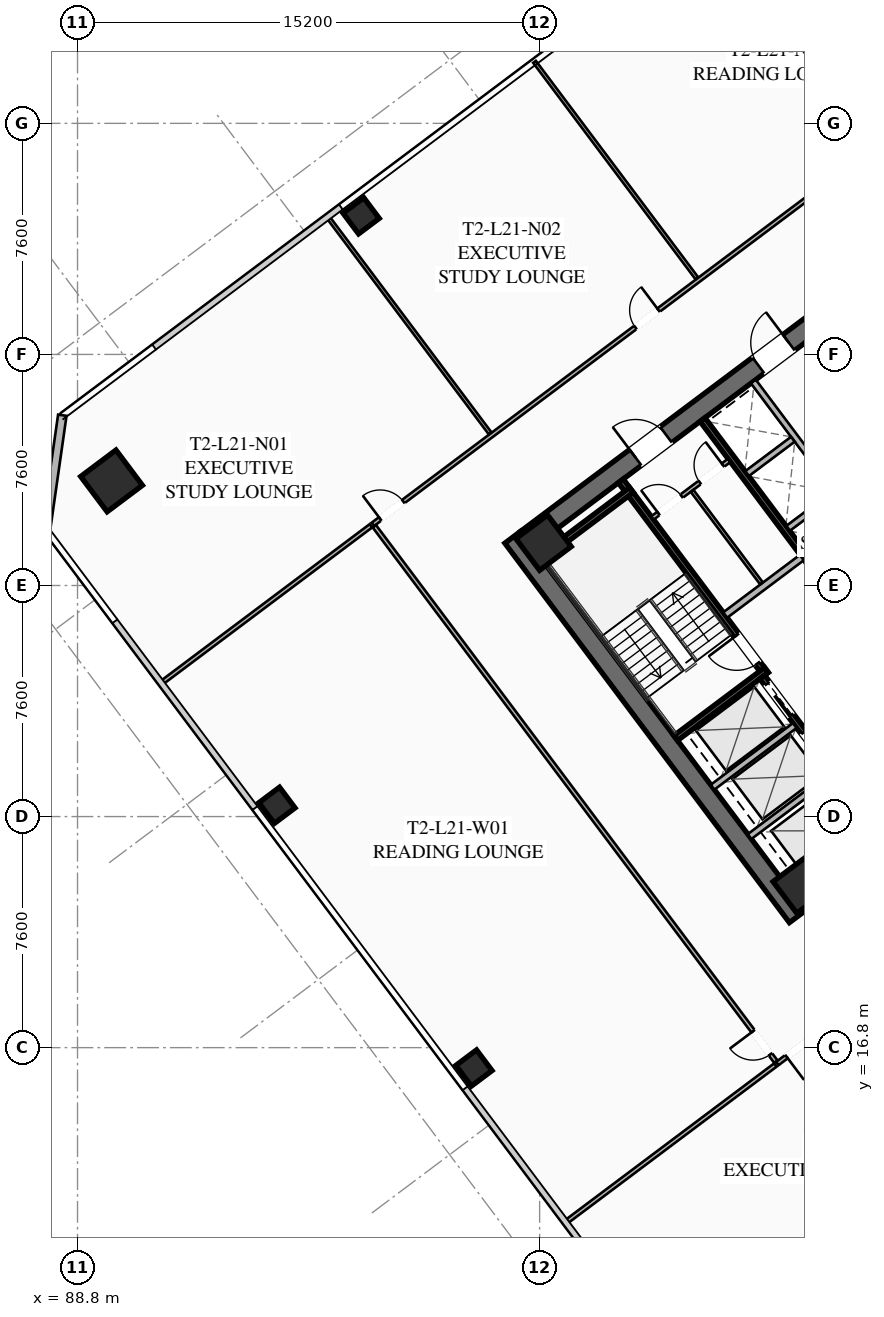
"""IFC4 building model, lengths in metres.
Left out: names, types, materials, properties, quantities, classifications, styles, units other than length and angle.
Written with IfcOpenShell. Run it as: python <this file> out.ifc"""

import sys

from ifc_helpers import new_model, si_unit, direction, frame, frame_2d, origin, origin_2d, place, context, subcontext, project, spatial, rectangle, hollow_rectangle, extrude, element, fill, save


model = new_model("IFC4")
c1 = context("Model", 3, precision=1e-05, world=origin(), true_north=direction((0.0, 1.0)))
c2 = subcontext(c1, "Body", "Model", "MODEL_VIEW")
j1 = project(units=[si_unit("LENGTHUNIT", "METRE"), si_unit("PLANEANGLEUNIT", "RADIAN")], contexts=[c1])
p1 = place(None, origin())
s1 = spatial("IfcSite", under=j1, at=p1, CompositionType="ELEMENT")
p2 = place(p1, origin())
s2 = spatial("IfcBuilding", under=s1, at=p2, CompositionType="ELEMENT")
p3 = place(p2, frame((0.0, 0.0, 81.4)))
s3 = spatial("IfcBuildingStorey", under=s2, at=p3, CompositionType="ELEMENT", Elevation=81.4)
p4 = place(p3, frame((112.476, 21.107, 0.0), z_axis=(0.0, 0.0, 1.0), x_axis=(-0.600005007985, 0.799996243986, 0.0)))
e1 = element("IfcWall", 1, at=p4, inside=s3, PredefinedType="SHEAR", context=c2, shape_type="SweptSolid", body=[
    extrude(rectangle(XDim=15.6, YDim=0.65, at=frame_2d((7.8, 0.0))), origin(), (0.0, 0.0, 1.0), 3.55),
])
p5 = place(p3, frame((124.429, 30.478, 0.0), z_axis=(0.0, 0.0, 1.0), x_axis=(-0.799998028465, -0.600002628705, 0.0)))
e2 = element("IfcWall", 2, at=p5, inside=s3, PredefinedType="SHEAR", context=c2, shape_type="SweptSolid", body=[
    extrude(rectangle(XDim=14.86, YDim=0.65, at=frame_2d((7.43, 0.0))), origin(), (0.0, 0.0, 1.0), 3.55),
])
p6 = place(p5, frame((9.13, 0.0, 0.0)))
e3 = element("IfcOpeningElement", 3, at=p6, cuts=e2, PredefinedType="OPENING", context=c2, shape_type="SweptSolid", body=[
    extrude(rectangle(XDim=1.25, YDim=2.25, at=frame_2d((0.625, 1.125))), frame((0.0, 0.335, 0.0), z_axis=(0.0, -1.0, 0.0), x_axis=(1.0, 0.0, 0.0)), (0.0, 0.0, 1.0), 0.67),
])
p7 = place(p5, frame((4.08, 0.0, 0.0)))
e4 = element("IfcOpeningElement", 4, at=p7, cuts=e2, PredefinedType="OPENING", context=c2, shape_type="SweptSolid", body=[
    extrude(rectangle(XDim=1.25, YDim=2.25, at=frame_2d((0.625, 1.125))), frame((0.0, 0.335, 0.0), z_axis=(0.0, -1.0, 0.0), x_axis=(1.0, 0.0, 0.0)), (0.0, 0.0, 1.0), 0.67),
])
p8 = place(p3, frame((103.571, 33.522, 0.0), z_axis=(0.0, 0.0, 1.0), x_axis=(0.799998028465, 0.600002628705, 0.0)))
e5 = element("IfcWall", 5, at=p8, inside=s3, PredefinedType="SHEAR", context=c2, shape_type="SweptSolid", body=[
    extrude(rectangle(XDim=14.86, YDim=0.65, at=frame_2d((7.43, 0.0))), origin(), (0.0, 0.0, 1.0), 3.55),
])
p9 = place(p8, frame((4.48, 0.0, 0.0)))
e6 = element("IfcOpeningElement", 6, at=p9, cuts=e5, PredefinedType="OPENING", context=c2, shape_type="SweptSolid", body=[
    extrude(rectangle(XDim=1.25, YDim=2.25, at=frame_2d((0.625, 1.125))), frame((0.0, 0.335, 0.0), z_axis=(0.0, -1.0, 0.0), x_axis=(1.0, 0.0, 0.0)), (0.0, 0.0, 1.0), 0.67),
])
p10 = place(p8, frame((9.53, 0.0, 0.0)))
e7 = element("IfcOpeningElement", 7, at=p10, cuts=e5, PredefinedType="OPENING", context=c2, shape_type="SweptSolid", body=[
    extrude(rectangle(XDim=1.25, YDim=2.25, at=frame_2d((0.625, 1.125))), frame((0.0, 0.335, 0.0), z_axis=(0.0, -1.0, 0.0), x_axis=(1.0, 0.0, 0.0)), (0.0, 0.0, 1.0), 0.67),
])
for number, where, z_axis, x_axis in (
    (8, (112.59, 22.13, 0.0), (0.0, 0.0, 1.0), (0.8, 0.6, 0.0)),
    (9, (104.13, 33.41, 0.0), (0.0, 0.0, 1.0), (0.8, 0.6, 0.0)),
):
    element("IfcColumn", number, at=place(p3, frame(where, z_axis=z_axis, x_axis=x_axis)), inside=s3, PredefinedType="COLUMN", context=c2, shape_type="SweptSolid", body=[
        extrude(hollow_rectangle(XDim=1.3, YDim=1.3, WallThickness=0.05, at=origin_2d()), origin(), (0.0, 0.0, 1.0), 3.35),
    ])
p11 = place(p3, frame((89.92, 35.44, 0.0), z_axis=(0.0, 0.0, 1.0), x_axis=(0.799999996291, 0.600000004945, 0.0)))
e10 = element("IfcColumn", 10, at=p11, inside=s3, PredefinedType="COLUMN", context=c2, shape_type="SweptSolid", body=[
    extrude(hollow_rectangle(XDim=1.45, YDim=1.45, WallThickness=0.055, at=origin_2d()), origin(), (0.0, 0.0, 1.0), 3.35),
])
for number, where, z_axis, x_axis in (
    (11, (98.13, 44.16, 0.0), (0.0, 0.0, 1.0), (0.8, 0.6, 0.0)),
    (12, (95.36, 24.77, 0.0), (0.0, 0.0, 1.0), (0.8, 0.6, 0.0)),
    (13, (101.84, 16.13, 0.0), (0.0, 0.0, 1.0), (0.8, 0.6, 0.0)),
):
    element("IfcColumn", number, at=place(p3, frame(where, z_axis=z_axis, x_axis=x_axis)), inside=s3, PredefinedType="COLUMN", context=c2, shape_type="SweptSolid", body=[
        extrude(hollow_rectangle(XDim=0.85, YDim=0.85, WallThickness=0.035, at=origin_2d()), origin(), (0.0, 0.0, 1.0), 3.35),
    ])
p12 = place(p3, frame((87.76, 33.82, 0.0), z_axis=(0.0, 0.0, 1.0), x_axis=(0.141430307517, 0.989948214866, 0.0)))
e14 = element("IfcWall", 14, at=p12, inside=s3, PredefinedType="SOLIDWALL", context=c2, shape_type="SweptSolid", body=[
    extrude(rectangle(XDim=3.818, YDim=0.28, at=frame_2d((1.909, 0.0))), origin(), (0.0, 0.0, 1.0), 3.35),
])
p13 = place(p3, frame((111.44, 29.08, 0.0), z_axis=(0.0, 0.0, 1.0), x_axis=(-0.600009827119, 0.799992629566, 0.0)))
e15 = element("IfcWall", 15, at=p13, inside=s3, PredefinedType="SHEAR", context=c2, shape_type="SweptSolid", body=[
    extrude(rectangle(XDim=7.95, YDim=0.2, at=frame_2d((3.975, 0.0))), origin(), (0.0, 0.0, 1.0), 3.35),
])
p14 = place(p13, frame((0.45, 0.0, 0.0)))
e16 = element("IfcOpeningElement", 16, at=p14, cuts=e15, PredefinedType="OPENING", context=c2, shape_type="SweptSolid", body=[
    extrude(rectangle(XDim=1.15, YDim=2.2, at=frame_2d((0.575, 1.1))), frame((0.0, 0.11, 0.0), z_axis=(0.0, -1.0, 0.0), x_axis=(1.0, 0.0, 0.0)), (0.0, 0.0, 1.0), 0.22),
])
for number, where, z_axis, x_axis in (
    (17, (108.476, 26.982, 0.0), (0.0, 0.0, 1.0), (0.8, 0.6, 0.0)),
    (18, (104.036, 32.902, 0.0), (0.0, 0.0, 1.0), (0.8, 0.6, 0.0)),
):
    element("IfcWall", number, at=place(p3, frame(where, z_axis=z_axis, x_axis=x_axis)), inside=s3, PredefinedType="SHEAR", context=c2, shape_type="SweptSolid", body=[
        extrude(rectangle(XDim=3.73, YDim=0.2, at=frame_2d((1.865, 0.0))), origin(), (0.0, 0.0, 1.0), 3.35),
    ])
p15 = place(p3, frame((117.938, 26.016, 0.0), z_axis=(0.0, 0.0, 1.0), x_axis=(-0.600005463273, 0.799995902516, 0.0)))
e19 = element("IfcWall", 19, at=p15, inside=s3, PredefinedType="SHEAR", context=c2, shape_type="SweptSolid", body=[
    extrude(rectangle(XDim=14.3, YDim=0.2, at=frame_2d((7.15, 0.0))), origin(), (0.0, 0.0, 1.0), 3.35),
])
p16 = place(p3, frame((110.104, 31.028, 0.0), z_axis=(0.0, 0.0, 1.0), x_axis=(0.800018601094, 0.59997519774, 0.0)))
e20 = element("IfcWall", 20, at=p16, inside=s3, PredefinedType="SOLIDWALL", context=c2, shape_type="SweptSolid", body=[
    extrude(rectangle(XDim=3.15, YDim=0.22, at=frame_2d((1.575, 0.0))), origin(), (0.0, 0.0, 1.0), 2.703),
])
p17 = place(p3, frame((115.13, 23.91, 0.0), z_axis=(0.0, 0.0, 1.0), x_axis=(-0.599975393228, 0.800018454488, 0.0)))
e21 = element("IfcWall", 21, at=p17, inside=s3, PredefinedType="SHEAR", context=c2, shape_type="SweptSolid", body=[
    extrude(rectangle(XDim=6.35, YDim=0.2, at=frame_2d((3.175, 0.0))), origin(), (0.0, 0.0, 1.0), 3.35),
])
p18 = place(p17, frame((4.775, 0.0, 0.0)))
e22 = element("IfcOpeningElement", 22, at=p18, cuts=e21, PredefinedType="OPENING", context=c2, shape_type="SweptSolid", body=[
    extrude(rectangle(XDim=1.3, YDim=2.25, at=frame_2d((0.65, 1.125))), frame((0.0, 0.11, 0.0), z_axis=(0.0, -1.0, 0.0), x_axis=(1.0, 0.0, 0.0)), (0.0, 0.0, 1.0), 0.22),
])
p19 = place(p17, frame((2.775, 0.0, 0.0)))
e23 = element("IfcOpeningElement", 23, at=p19, cuts=e21, PredefinedType="OPENING", context=c2, shape_type="SweptSolid", body=[
    extrude(rectangle(XDim=1.3, YDim=2.25, at=frame_2d((0.65, 1.125))), frame((0.0, 0.11, 0.0), z_axis=(0.0, -1.0, 0.0), x_axis=(1.0, 0.0, 0.0)), (0.0, 0.0, 1.0), 0.22),
])
p20 = place(p17, frame((0.575, 0.0, 0.0)))
e24 = element("IfcOpeningElement", 24, at=p20, cuts=e21, PredefinedType="OPENING", context=c2, shape_type="SweptSolid", body=[
    extrude(rectangle(XDim=1.3, YDim=2.25, at=frame_2d((0.65, 1.125))), frame((0.0, 0.11, 0.0), z_axis=(0.0, -1.0, 0.0), x_axis=(1.0, 0.0, 0.0)), (0.0, 0.0, 1.0), 0.22),
])
for number, where, z_axis, x_axis in (
    (25, (110.906, 23.742, 0.0), (0.0, 0.0, 1.0), (0.8, 0.6, 0.0)),
    (26, (109.688, 25.366, 0.0), (0.0, 0.0, 1.0), (0.8, 0.6, 0.0)),
):
    element("IfcWall", number, at=place(p3, frame(where, z_axis=z_axis, x_axis=x_axis)), inside=s3, PredefinedType="SOLIDWALL", context=c2, shape_type="SweptSolid", body=[
        extrude(rectangle(XDim=3.38, YDim=0.2, at=frame_2d((1.69, 0.0))), origin(), (0.0, 0.0, 1.0), 3.35),
    ])
p21 = place(p3, frame((107.71, 34.22, 0.0), z_axis=(0.0, 0.0, 1.0), x_axis=(0.799981399002, 0.60002480053, 0.0)))
e27 = element("IfcWall", 27, at=p21, inside=s3, PredefinedType="PARTITIONING", context=c2, shape_type="SweptSolid", body=[
    extrude(rectangle(XDim=3.15, YDim=0.135, at=frame_2d((1.575, 0.0))), origin(), (0.0, 0.0, 1.0), 2.703),
])
p22 = place(p21, frame((0.25, 0.0, 0.0)))
e28 = element("IfcOpeningElement", 28, at=p22, cuts=e27, PredefinedType="OPENING", context=c2, shape_type="SweptSolid", body=[
    extrude(rectangle(XDim=0.95, YDim=2.05, at=frame_2d((0.475, 1.025))), frame((0.0, 0.077, 0.0), z_axis=(0.0, -1.0, 0.0), x_axis=(1.0, 0.0, 0.0)), (0.0, 0.0, 1.0), 0.155),
])
p23 = place(p21, frame((1.95, 0.0, 0.0)))
e29 = element("IfcOpeningElement", 29, at=p23, cuts=e27, PredefinedType="OPENING", context=c2, shape_type="SweptSolid", body=[
    extrude(rectangle(XDim=0.95, YDim=2.05, at=frame_2d((0.475, 1.025))), frame((0.0, 0.077, 0.0), z_axis=(0.0, -1.0, 0.0), x_axis=(1.0, 0.0, 0.0)), (0.0, 0.0, 1.0), 0.155),
])
p24 = place(p3, frame((111.296, 32.072, 0.0), z_axis=(0.0, 0.0, 1.0), x_axis=(-0.59995887973, 0.800030838552, 0.0)))
e30 = element("IfcWall", 30, at=p24, inside=s3, PredefinedType="PARTITIONING", context=c2, shape_type="SweptSolid", body=[
    extrude(rectangle(XDim=3.8, YDim=0.11, at=frame_2d((1.9, 0.0))), origin(), (0.0, 0.0, 1.0), 2.703),
])
p25 = place(p3, frame((115.11, 33.27, 0.0), z_axis=(0.0, 0.0, 1.0), x_axis=(-0.600011488909, 0.79999138319, 0.0)))
e31 = element("IfcWall", 31, at=p25, inside=s3, PredefinedType="SOLIDWALL", context=c2, shape_type="SweptSolid", body=[
    extrude(rectangle(XDim=6.8, YDim=0.2, at=frame_2d((3.4, 0.0))), origin(), (0.0, 0.0, 1.0), 3.35),
])
p26 = place(p3, frame((112.176, 33.882, 0.0), z_axis=(0.0, 0.0, 1.0), x_axis=(0.8, 0.6, 0.0)))
e32 = element("IfcWall", 32, at=p26, inside=s3, PredefinedType="SOLIDWALL", context=c2, shape_type="SweptSolid", body=[
    extrude(rectangle(XDim=1.88, YDim=0.2, at=frame_2d((0.94, 0.0))), origin(), (0.0, 0.0, 1.0), 3.35),
])
p27 = place(p3, frame((110.826, 35.682, 0.0), z_axis=(0.0, 0.0, 1.0), x_axis=(0.799984418148, 0.600020775241, 0.0)))
e33 = element("IfcWall", 33, at=p27, inside=s3, PredefinedType="SOLIDWALL", context=c2, shape_type="SweptSolid", body=[
    extrude(rectangle(XDim=1.88, YDim=0.2, at=frame_2d((0.94, 0.0))), origin(), (0.0, 0.0, 1.0), 3.35),
])
p28 = place(p3, frame((98.516, 34.012, 0.0), z_axis=(0.0, 0.0, 1.0), x_axis=(0.8, 0.6, 0.0)))
e34 = element("IfcWall", 34, at=p28, inside=s3, PredefinedType="PARTITIONING", context=c2, shape_type="SweptSolid", body=[
    extrude(rectangle(XDim=28.23, YDim=0.135, at=frame_2d((14.115, 0.0))), origin(), (0.0, 0.0, 1.0), 2.703),
])
p29 = place(p28, frame((0.3, 0.0, 0.0)))
e35 = element("IfcOpeningElement", 35, at=p29, cuts=e34, PredefinedType="OPENING", context=c2, shape_type="SweptSolid", body=[
    extrude(rectangle(XDim=0.95, YDim=2.05, at=frame_2d((0.475, 1.025))), frame((0.0, 0.077, 0.0), z_axis=(0.0, -1.0, 0.0), x_axis=(1.0, 0.0, 0.0)), (0.0, 0.0, 1.0), 0.155),
])
p30 = place(p28, frame((10.792, 0.0, 0.0)))
e36 = element("IfcOpeningElement", 36, at=p30, cuts=e34, PredefinedType="OPENING", context=c2, shape_type="SweptSolid", body=[
    extrude(rectangle(XDim=0.95, YDim=2.05, at=frame_2d((0.475, 1.025))), frame((0.0, 0.077, 0.0), z_axis=(0.0, -1.0, 0.0), x_axis=(1.0, 0.0, 0.0)), (0.0, 0.0, 1.0), 0.155),
])
p31 = place(p28, frame((26.98, 0.0, 0.0)))
e37 = element("IfcOpeningElement", 37, at=p31, cuts=e34, PredefinedType="OPENING", context=c2, shape_type="SweptSolid", body=[
    extrude(rectangle(XDim=0.95, YDim=2.05, at=frame_2d((0.475, 1.025))), frame((0.0, 0.077, 0.0), z_axis=(0.0, -1.0, 0.0), x_axis=(1.0, 0.0, 0.0)), (0.0, 0.0, 1.0), 0.155),
])
for number, where, z_axis, x_axis in (
    (38, (102.372, 37.004, 0.0), (0.0, 0.0, 1.0), (-0.6, 0.8, 0.0)),
    (39, (109.172, 42.104, 0.0), (0.0, 0.0, 1.0), (-0.6, 0.8, 0.0)),
):
    element("IfcWall", number, at=place(p3, frame(where, z_axis=z_axis, x_axis=x_axis)), inside=s3, PredefinedType="PARTITIONING", context=c2, shape_type="SweptSolid", body=[
        extrude(rectangle(XDim=8.9, YDim=0.11, at=frame_2d((4.45, 0.0))), origin(), (0.0, 0.0, 1.0), 2.703),
    ])
p32 = place(p3, frame((134.402, 33.214, 0.0), z_axis=(0.0, 0.0, 1.0), x_axis=(-0.799995848831, -0.600005534853, 0.0)))
e40 = element("IfcWall", 40, at=p32, inside=s3, PredefinedType="PARTITIONING", context=c2, shape_type="SweptSolid", body=[
    extrude(rectangle(XDim=28.23, YDim=0.135, at=frame_2d((14.115, 0.0))), origin(), (0.0, 0.0, 1.0), 2.703),
])
p33 = place(p32, frame((26.9, 0.0, 0.0)))
e41 = element("IfcOpeningElement", 41, at=p33, cuts=e40, PredefinedType="OPENING", context=c2, shape_type="SweptSolid", body=[
    extrude(rectangle(XDim=0.95, YDim=2.05, at=frame_2d((0.475, 1.025))), frame((0.0, 0.077, 0.0), z_axis=(0.0, -1.0, 0.0), x_axis=(1.0, 0.0, 0.0)), (0.0, 0.0, 1.0), 0.155),
])
p34 = place(p32, frame((0.38, 0.0, 0.0)))
e42 = element("IfcOpeningElement", 42, at=p34, cuts=e40, PredefinedType="OPENING", context=c2, shape_type="SweptSolid", body=[
    extrude(rectangle(XDim=0.95, YDim=2.05, at=frame_2d((0.475, 1.025))), frame((0.0, 0.077, 0.0), z_axis=(0.0, -1.0, 0.0), x_axis=(1.0, 0.0, 0.0)), (0.0, 0.0, 1.0), 0.155),
])
p35 = place(p3, frame((111.77, 16.34, 0.0), z_axis=(0.0, 0.0, 1.0), x_axis=(-0.600003549523, 0.799997337845, 0.0)))
e43 = element("IfcWall", 43, at=p35, inside=s3, PredefinedType="PARTITIONING", context=c2, shape_type="SweptSolid", body=[
    extrude(rectangle(XDim=22.01, YDim=0.135, at=frame_2d((11.005, 0.0))), origin(), (0.0, 0.0, 1.0), 2.703),
])
p36 = place(p35, frame((0.3, 0.0, 0.0)))
e44 = element("IfcOpeningElement", 44, at=p36, cuts=e43, PredefinedType="OPENING", context=c2, shape_type="SweptSolid", body=[
    extrude(rectangle(XDim=0.95, YDim=2.05, at=frame_2d((0.475, 1.025))), frame((0.0, 0.077, 0.0), z_axis=(0.0, -1.0, 0.0), x_axis=(1.0, 0.0, 0.0)), (0.0, 0.0, 1.0), 0.155),
])
for number, where, z_axis, x_axis in (
    (45, (98.452, 33.964, 0.0), (0.0, 0.0, 1.0), (-0.8, -0.6, 0.0)),
    (46, (104.858, 11.056, 0.0), (0.0, 0.0, 1.0), (0.8, 0.6, 0.0)),
):
    element("IfcWall", number, at=place(p3, frame(where, z_axis=z_axis, x_axis=x_axis)), inside=s3, PredefinedType="PARTITIONING", context=c2, shape_type="SweptSolid", body=[
        extrude(rectangle(XDim=8.62, YDim=0.135, at=frame_2d((4.31, 0.0))), origin(), (0.0, 0.0, 1.0), 2.703),
    ])
p37 = place(p9, origin())
e47 = element("IfcDoor", 47, at=p37, inside=s3, OperationType="SINGLE_SWING_LEFT", PredefinedType="DOOR", context=c2, shape_type="SweptSolid", body=[
    extrude(rectangle(XDim=1.25, YDim=2.25, at=frame_2d((0.625, 1.125))), frame((0.0, 0.025, 0.0), z_axis=(0.0, -1.0, 0.0), x_axis=(1.0, 0.0, 0.0)), (0.0, 0.0, 1.0), 0.05),
])
fill(e6, e47)
p38 = place(p10, origin())
e48 = element("IfcDoor", 48, at=p38, inside=s3, OperationType="SINGLE_SWING_RIGHT", PredefinedType="DOOR", context=c2, shape_type="SweptSolid", body=[
    extrude(rectangle(XDim=1.25, YDim=2.25, at=frame_2d((0.625, 1.125))), frame((0.0, 0.025, 0.0), z_axis=(0.0, -1.0, 0.0), x_axis=(1.0, 0.0, 0.0)), (0.0, 0.0, 1.0), 0.05),
])
fill(e7, e48)
p39 = place(p14, origin())
e49 = element("IfcDoor", 49, at=p39, inside=s3, OperationType="SINGLE_SWING_RIGHT", PredefinedType="DOOR", context=c2, shape_type="SweptSolid", body=[
    extrude(rectangle(XDim=1.15, YDim=2.2, at=frame_2d((0.575, 1.1))), frame((0.0, 0.025, 0.0), z_axis=(0.0, -1.0, 0.0), x_axis=(1.0, 0.0, 0.0)), (0.0, 0.0, 1.0), 0.05),
])
fill(e16, e49)
p40 = place(p22, origin())
e50 = element("IfcDoor", 50, at=p40, inside=s3, OperationType="SINGLE_SWING_LEFT", PredefinedType="DOOR", context=c2, shape_type="SweptSolid", body=[
    extrude(rectangle(XDim=0.95, YDim=2.05, at=frame_2d((0.475, 1.025))), frame((0.0, 0.025, 0.0), z_axis=(0.0, -1.0, 0.0), x_axis=(1.0, 0.0, 0.0)), (0.0, 0.0, 1.0), 0.05),
])
fill(e28, e50)
p41 = place(p23, origin())
e51 = element("IfcDoor", 51, at=p41, inside=s3, OperationType="SINGLE_SWING_RIGHT", PredefinedType="DOOR", context=c2, shape_type="SweptSolid", body=[
    extrude(rectangle(XDim=0.95, YDim=2.05, at=frame_2d((0.475, 1.025))), frame((0.0, 0.025, 0.0), z_axis=(0.0, -1.0, 0.0), x_axis=(1.0, 0.0, 0.0)), (0.0, 0.0, 1.0), 0.05),
])
fill(e29, e51)
p42 = place(p29, origin())
e52 = element("IfcDoor", 52, at=p42, inside=s3, OperationType="SINGLE_SWING_LEFT", PredefinedType="DOOR", context=c2, shape_type="SweptSolid", body=[
    extrude(rectangle(XDim=0.95, YDim=2.05, at=frame_2d((0.475, 1.025))), frame((0.0, 0.025, 0.0), z_axis=(0.0, -1.0, 0.0), x_axis=(1.0, 0.0, 0.0)), (0.0, 0.0, 1.0), 0.05),
])
fill(e35, e52)
p43 = place(p30, origin())
e53 = element("IfcDoor", 53, at=p43, inside=s3, OperationType="SINGLE_SWING_RIGHT", PredefinedType="DOOR", context=c2, shape_type="SweptSolid", body=[
    extrude(rectangle(XDim=0.95, YDim=2.05, at=frame_2d((0.475, 1.025))), frame((0.0, 0.025, 0.0), z_axis=(0.0, -1.0, 0.0), x_axis=(1.0, 0.0, 0.0)), (0.0, 0.0, 1.0), 0.05),
])
fill(e36, e53)
p44 = place(p33, origin())
e54 = element("IfcDoor", 54, at=p44, inside=s3, OperationType="SINGLE_SWING_RIGHT", PredefinedType="DOOR", context=c2, shape_type="SweptSolid", body=[
    extrude(rectangle(XDim=0.95, YDim=2.05, at=frame_2d((0.475, 1.025))), frame((0.0, 0.025, 0.0), z_axis=(0.0, -1.0, 0.0), x_axis=(1.0, 0.0, 0.0)), (0.0, 0.0, 1.0), 0.05),
])
fill(e41, e54)
p45 = place(p36, origin())
e55 = element("IfcDoor", 55, at=p45, inside=s3, OperationType="SINGLE_SWING_RIGHT", PredefinedType="DOOR", context=c2, shape_type="SweptSolid", body=[
    extrude(rectangle(XDim=0.95, YDim=2.05, at=frame_2d((0.475, 1.025))), frame((0.0, 0.025, 0.0), z_axis=(0.0, -1.0, 0.0), x_axis=(1.0, 0.0, 0.0)), (0.0, 0.0, 1.0), 0.05),
])
fill(e44, e55)
p46 = place(p18, origin())
e56 = element("IfcDoor", 56, at=p46, inside=s3, OperationType="SLIDING_TO_LEFT", PredefinedType="DOOR", context=c2, shape_type="SweptSolid", body=[
    extrude(rectangle(XDim=1.3, YDim=2.25, at=frame_2d((0.65, 1.125))), frame((0.0, 0.025, 0.0), z_axis=(0.0, -1.0, 0.0), x_axis=(1.0, 0.0, 0.0)), (0.0, 0.0, 1.0), 0.05),
])
fill(e22, e56)
p47 = place(p19, origin())
e57 = element("IfcDoor", 57, at=p47, inside=s3, OperationType="SLIDING_TO_LEFT", PredefinedType="DOOR", context=c2, shape_type="SweptSolid", body=[
    extrude(rectangle(XDim=1.3, YDim=2.25, at=frame_2d((0.65, 1.125))), frame((0.0, 0.025, 0.0), z_axis=(0.0, -1.0, 0.0), x_axis=(1.0, 0.0, 0.0)), (0.0, 0.0, 1.0), 0.05),
])
fill(e23, e57)
save(model, sys.argv[1])
